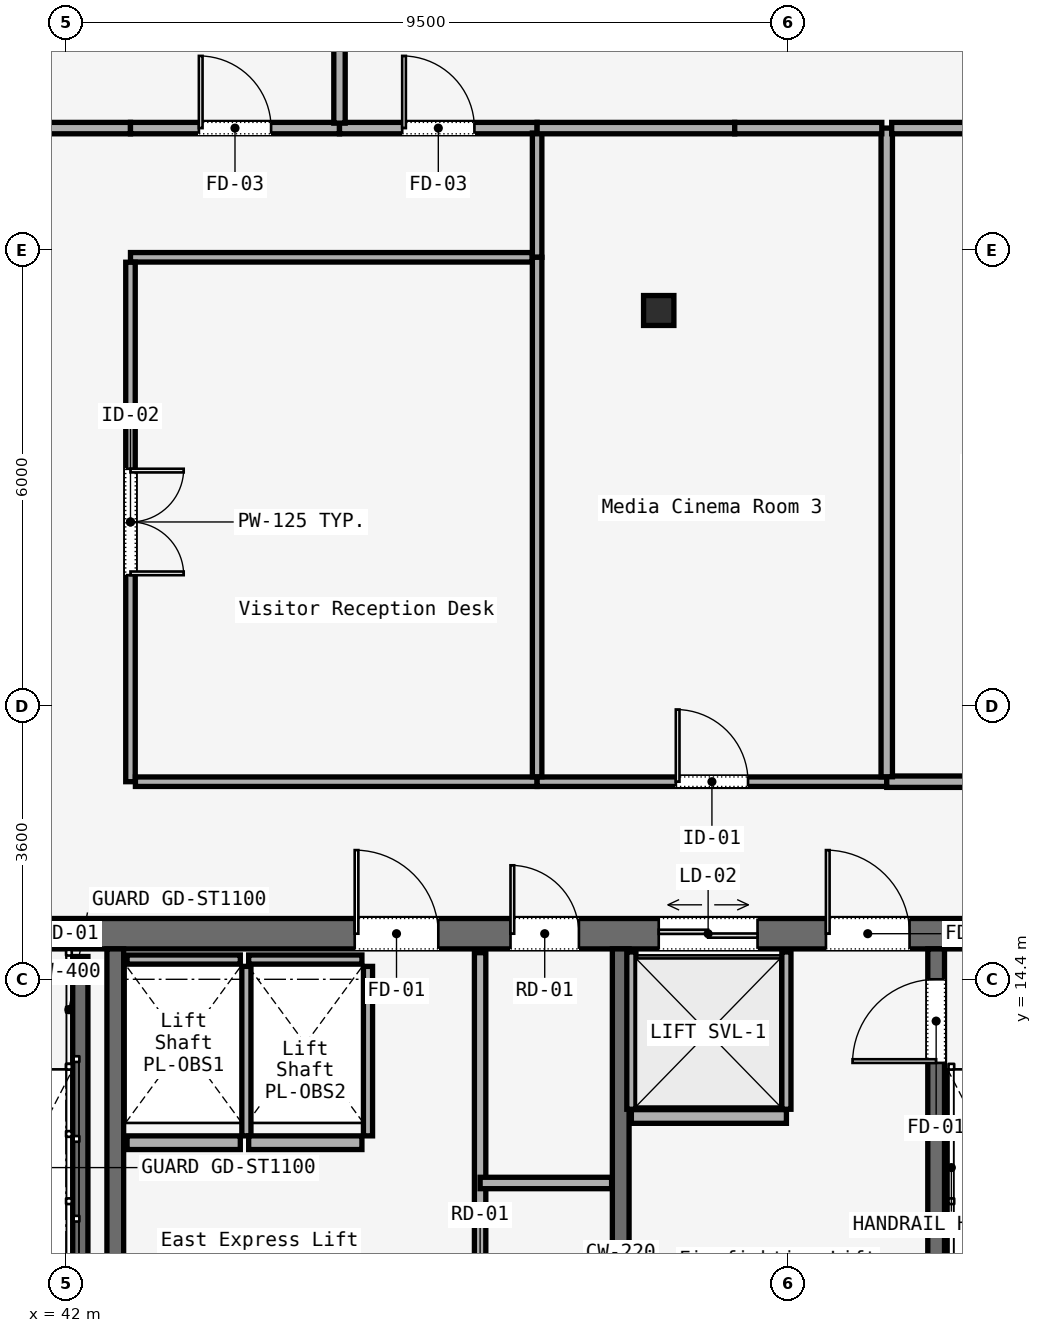
"""IFC4 building model, lengths in metres.
Left out: names, types, materials, properties, quantities, classifications, styles, units other than length and angle.
Written with IfcOpenShell. Run it as: python <this file> out.ifc"""

import sys

from ifc_helpers import new_model, si_unit, direction, frame, frame_2d, origin, origin_2d, place, context, subcontext, project, spatial, rectangle, i_section, extrude, element, fill, save


model = new_model("IFC4")
c1 = context("Model", 3, precision=1e-05, world=origin(), true_north=direction((0.0, 1.0)))
c2 = subcontext(c1, "Body", "Model", "MODEL_VIEW")
j1 = project(units=[si_unit("LENGTHUNIT", "METRE"), si_unit("PLANEANGLEUNIT", "RADIAN")], contexts=[c1])
p1 = place(None, origin())
s1 = spatial("IfcSite", under=j1, at=p1, CompositionType="ELEMENT")
p2 = place(p1, origin())
s2 = spatial("IfcBuilding", under=s1, at=p2, CompositionType="ELEMENT")
p3 = place(p2, frame((0.0, 0.0, 244.6)))
s3 = spatial("IfcBuildingStorey", under=s2, at=p3, CompositionType="ELEMENT", Elevation=244.6)
p4 = place(p3, frame((26.45, 15.0, 0.0), z_axis=(0.0, 0.0, 1.0), x_axis=(1.0, 0.0, 0.0)))
e1 = element("IfcWall", 1, at=p4, inside=s3, PredefinedType="SOLIDWALL", context=c2, shape_type="SweptSolid", body=[
    extrude(rectangle(XDim=31.1, YDim=0.4, at=frame_2d((15.55, 0.0))), origin(), (0.0, 0.0, 1.0), 3.58),
])
p5 = place(p4, frame((1.65, 0.0, 0.0)))
e2 = element("IfcOpeningElement", 2, at=p5, cuts=e1, PredefinedType="OPENING", context=c2, shape_type="SweptSolid", body=[
    extrude(rectangle(XDim=1.1, YDim=2.2, at=frame_2d((0.55, 1.1))), frame((0.0, 0.2, 0.0), z_axis=(0.0, -1.0, 0.0), x_axis=(1.0, 0.0, 0.0)), (0.0, 0.0, 1.0), 0.4),
])
p6 = place(p4, frame((13.65, 0.0, 0.0)))
e3 = element("IfcOpeningElement", 3, at=p6, cuts=e1, PredefinedType="OPENING", context=c2, shape_type="SweptSolid", body=[
    extrude(rectangle(XDim=1.1, YDim=2.2, at=frame_2d((0.55, 1.1))), frame((0.0, 0.2, 0.0), z_axis=(0.0, -1.0, 0.0), x_axis=(1.0, 0.0, 0.0)), (0.0, 0.0, 1.0), 0.4),
])
p7 = place(p4, frame((25.55, 0.0, 0.0)))
e4 = element("IfcOpeningElement", 4, at=p7, cuts=e1, PredefinedType="OPENING", context=c2, shape_type="SweptSolid", body=[
    extrude(rectangle(XDim=1.1, YDim=2.2, at=frame_2d((0.55, 1.1))), frame((0.0, 0.2, 0.0), z_axis=(0.0, -1.0, 0.0), x_axis=(1.0, 0.0, 0.0)), (0.0, 0.0, 1.0), 0.4),
])
p8 = place(p4, frame((19.35, 0.0, 0.0)))
e5 = element("IfcOpeningElement", 5, at=p8, cuts=e1, PredefinedType="OPENING", context=c2, shape_type="SweptSolid", body=[
    extrude(rectangle(XDim=1.1, YDim=2.2, at=frame_2d((0.55, 1.1))), frame((0.0, 0.2, 0.0), z_axis=(0.0, -1.0, 0.0), x_axis=(1.0, 0.0, 0.0)), (0.0, 0.0, 1.0), 0.4),
])
p9 = place(p4, frame((21.4, 0.0, 0.0)))
e6 = element("IfcOpeningElement", 6, at=p9, cuts=e1, PredefinedType="OPENING", context=c2, shape_type="SweptSolid", body=[
    extrude(rectangle(XDim=0.9, YDim=2.1, at=frame_2d((0.45, 1.05))), frame((0.0, 0.2, 0.0), z_axis=(0.0, -1.0, 0.0), x_axis=(1.0, 0.0, 0.0)), (0.0, 0.0, 1.0), 0.4),
])
p10 = place(p4, frame((5.54, 0.0, 0.0)))
e7 = element("IfcOpeningElement", 7, at=p10, cuts=e1, PredefinedType="OPENING", context=c2, shape_type="SweptSolid", body=[
    extrude(rectangle(XDim=0.95, YDim=2.2, at=frame_2d((0.475, 1.1))), frame((0.0, 0.2, 0.0), z_axis=(0.0, -1.0, 0.0), x_axis=(1.0, 0.0, 0.0)), (0.0, 0.0, 1.0), 0.4),
])
p11 = place(p4, frame((9.49, 0.0, 0.0)))
e8 = element("IfcOpeningElement", 8, at=p11, cuts=e1, PredefinedType="OPENING", context=c2, shape_type="SweptSolid", body=[
    extrude(rectangle(XDim=0.95, YDim=2.2, at=frame_2d((0.475, 1.1))), frame((0.0, 0.2, 0.0), z_axis=(0.0, -1.0, 0.0), x_axis=(1.0, 0.0, 0.0)), (0.0, 0.0, 1.0), 0.4),
])
p12 = place(p4, frame((23.35, 0.0, 0.0)))
e9 = element("IfcOpeningElement", 9, at=p12, cuts=e1, PredefinedType="OPENING", context=c2, shape_type="SweptSolid", body=[
    extrude(rectangle(XDim=1.3, YDim=2.3, at=frame_2d((0.65, 1.15))), frame((0.0, 0.2, 0.0), z_axis=(0.0, -1.0, 0.0), x_axis=(1.0, 0.0, 0.0)), (0.0, 0.0, 1.0), 0.4),
])
for number, where, z_axis, x_axis in (
    (10, (42.65, 5.8, 0.0), (0.0, 0.0, 1.0), (0.0, 1.0, 0.0)),
    (11, (49.3, 5.8, 0.0), (0.0, 0.0, 1.0), (0.0, 1.0, 0.0)),
):
    element("IfcWall", number, at=place(p3, frame(where, z_axis=z_axis, x_axis=x_axis)), inside=s3, PredefinedType="SOLIDWALL", context=c2, shape_type="SweptSolid", body=[
        extrude(rectangle(XDim=9.0, YDim=0.22, at=frame_2d((4.5, 0.0))), origin(), (0.0, 0.0, 1.0), 3.58),
    ])
p13 = place(p3, frame((53.45, 5.8, 0.0), z_axis=(0.0, 0.0, 1.0), x_axis=(0.0, 1.0, 0.0)))
e12 = element("IfcWall", 12, at=p13, inside=s3, PredefinedType="SOLIDWALL", context=c2, shape_type="SweptSolid", body=[
    extrude(rectangle(XDim=9.0, YDim=0.22, at=frame_2d((4.5, 0.0))), origin(), (0.0, 0.0, 1.0), 3.58),
])
p14 = place(p13, frame((7.5, 0.0, 0.0)))
e13 = element("IfcOpeningElement", 13, at=p14, cuts=e12, PredefinedType="OPENING", context=c2, shape_type="SweptSolid", body=[
    extrude(rectangle(XDim=1.1, YDim=2.2, at=frame_2d((0.55, 1.1))), frame((0.0, 0.11, 0.0), z_axis=(0.0, -1.0, 0.0), x_axis=(1.0, 0.0, 0.0)), (0.0, 0.0, 1.0), 0.22),
])
p15 = place(p3, frame((49.8, 23.2, 0.0), z_axis=(0.0, 0.0, 1.0), x_axis=(1.0, 0.0, 0.0)))
e14 = element("IfcColumn", 14, at=p15, inside=s3, PredefinedType="COLUMN", context=c2, shape_type="SweptSolid", body=[
    extrude(i_section(OverallWidth=0.399, OverallDepth=0.394, WebThickness=0.023, FlangeThickness=0.037, FilletRadius=0.015, at=origin_2d()), origin(), (0.0, 0.0, 1.0), 3.58),
])
p16 = place(p3, frame((42.19, 14.7, 0.0), z_axis=(0.0, 0.0, 1.0), x_axis=(0.0, -1.0, 0.0)))
e15 = element("IfcWall", 15, at=p16, inside=s3, PredefinedType="SOLIDWALL", context=c2, shape_type="SweptSolid", body=[
    extrude(rectangle(XDim=7.65, YDim=0.2, at=frame_2d((3.825, 0.0))), origin(), (0.0, 0.0, 1.0), 3.8),
])
p17 = place(p3, frame((47.45, 5.9, 0.0), z_axis=(0.0, 0.0, 1.0), x_axis=(0.0, 1.0, 0.0)))
e16 = element("IfcWall", 16, at=p17, inside=s3, PredefinedType="PARTITIONING", context=c2, shape_type="SweptSolid", body=[
    extrude(rectangle(XDim=8.85, YDim=0.15, at=frame_2d((4.425, 0.0))), origin(), (0.0, 0.0, 1.0), 3.01),
])
p18 = place(p17, frame((3.9, 0.0, 0.0)))
e17 = element("IfcOpeningElement", 17, at=p18, cuts=e16, PredefinedType="OPENING", context=c2, shape_type="SweptSolid", body=[
    extrude(rectangle(XDim=0.9, YDim=2.1, at=frame_2d((0.45, 1.05))), frame((0.0, 0.075, 0.0), z_axis=(0.0, -1.0, 0.0), x_axis=(1.0, 0.0, 0.0)), (0.0, 0.0, 1.0), 0.15),
])
p19 = place(p3, frame((47.45, 11.72, 0.0), z_axis=(0.0, 0.0, 1.0), x_axis=(1.0, 0.0, 0.0)))
e18 = element("IfcWall", 18, at=p19, inside=s3, PredefinedType="PARTITIONING", context=c2, shape_type="SweptSolid", body=[
    extrude(rectangle(XDim=1.73, YDim=0.15, at=frame_2d((0.865, 0.0))), origin(), (0.0, 0.0, 1.0), 3.01),
])
p20 = place(p3, frame((42.805, 12.25, 0.0), z_axis=(0.0, 0.0, 1.0), x_axis=(1.0, 0.0, 0.0)))
e19 = element("IfcWall", 19, at=p20, inside=s3, PredefinedType="SOLIDWALL", context=c2, shape_type="SweptSolid", body=[
    extrude(rectangle(XDim=1.49, YDim=0.18, at=frame_2d((0.745, 0.0))), origin(), (0.0, 0.0, 1.0), 3.01),
])
p21 = place(p3, frame((42.805, 14.66, 0.0), z_axis=(0.0, 0.0, 1.0), x_axis=(1.0, 0.0, 0.0)))
e20 = element("IfcWall", 20, at=p21, inside=s3, PredefinedType="SOLIDWALL", context=c2, shape_type="SweptSolid", body=[
    extrude(rectangle(XDim=1.49, YDim=0.12, at=frame_2d((0.745, 0.0))), origin(), (0.0, 0.0, 1.0), 3.01),
])
p22 = place(p3, frame((44.375, 12.34, 0.0), z_axis=(0.0, 0.0, 1.0), x_axis=(0.0, 1.0, 0.0)))
e21 = element("IfcWall", 21, at=p22, inside=s3, PredefinedType="SOLIDWALL", context=c2, shape_type="SweptSolid", body=[
    extrude(rectangle(XDim=2.23, YDim=0.12, at=frame_2d((1.115, 0.0))), origin(), (0.0, 0.0, 1.0), 3.01),
])
p23 = place(p3, frame((44.405, 12.25, 0.0), z_axis=(0.0, 0.0, 1.0), x_axis=(1.0, 0.0, 0.0)))
e22 = element("IfcWall", 22, at=p23, inside=s3, PredefinedType="SOLIDWALL", context=c2, shape_type="SweptSolid", body=[
    extrude(rectangle(XDim=1.49, YDim=0.18, at=frame_2d((0.745, 0.0))), origin(), (0.0, 0.0, 1.0), 3.01),
])
p24 = place(p3, frame((44.405, 14.66, 0.0), z_axis=(0.0, 0.0, 1.0), x_axis=(1.0, 0.0, 0.0)))
e23 = element("IfcWall", 23, at=p24, inside=s3, PredefinedType="SOLIDWALL", context=c2, shape_type="SweptSolid", body=[
    extrude(rectangle(XDim=1.49, YDim=0.12, at=frame_2d((0.745, 0.0))), origin(), (0.0, 0.0, 1.0), 3.01),
])
p25 = place(p3, frame((45.975, 12.34, 0.0), z_axis=(0.0, 0.0, 1.0), x_axis=(0.0, 1.0, 0.0)))
e24 = element("IfcWall", 24, at=p25, inside=s3, PredefinedType="SOLIDWALL", context=c2, shape_type="SweptSolid", body=[
    extrude(rectangle(XDim=2.23, YDim=0.12, at=frame_2d((1.115, 0.0))), origin(), (0.0, 0.0, 1.0), 3.01),
])
p26 = place(p3, frame((49.44, 12.595, 0.0), z_axis=(0.0, 0.0, 1.0), x_axis=(1.0, 0.0, 0.0)))
e25 = element("IfcWall", 25, at=p26, inside=s3, PredefinedType="SOLIDWALL", context=c2, shape_type="SweptSolid", body=[
    extrude(rectangle(XDim=2.04, YDim=0.18, at=frame_2d((1.02, 0.0))), origin(), (0.0, 0.0, 1.0), 3.01),
])
for number, where, z_axis, x_axis in (
    (26, (49.44, 12.69, 0.0), (0.0, 0.0, 1.0), (0.0, 1.0, 0.0)),
    (27, (51.48, 12.69, 0.0), (0.0, 0.0, 1.0), (0.0, 1.0, 0.0)),
):
    element("IfcWall", number, at=place(p3, frame(where, z_axis=z_axis, x_axis=x_axis)), inside=s3, PredefinedType="SOLIDWALL", context=c2, shape_type="SweptSolid", body=[
        extrude(rectangle(XDim=2.07, YDim=0.12, at=frame_2d((1.035, 0.0))), origin(), (0.0, 0.0, 1.0), 3.01),
    ])
p27 = place(p3, frame((41.15, 25.6, 0.0), z_axis=(0.0, 0.0, 1.0), x_axis=(1.0, 0.0, 0.0)))
e28 = element("IfcWall", 28, at=p27, inside=s3, PredefinedType="PARTITIONING", context=c2, shape_type="SweptSolid", body=[
    extrude(rectangle(XDim=1.7, YDim=0.15, at=frame_2d((0.85, 0.0))), origin(), (0.0, 0.0, 1.0), 3.01),
])
p28 = place(p3, frame((42.85, 25.6, 0.0), z_axis=(0.0, 0.0, 1.0), x_axis=(1.0, 0.0, 0.0)))
e29 = element("IfcWall", 29, at=p28, inside=s3, PredefinedType="PARTITIONING", context=c2, shape_type="SweptSolid", body=[
    extrude(rectangle(XDim=2.75, YDim=0.15, at=frame_2d((1.375, 0.0))), origin(), (0.0, 0.0, 1.0), 3.01),
])
p29 = place(p28, frame((0.9, 0.0, 0.0)))
e30 = element("IfcOpeningElement", 30, at=p29, cuts=e29, PredefinedType="OPENING", context=c2, shape_type="SweptSolid", body=[
    extrude(rectangle(XDim=0.95, YDim=2.2, at=frame_2d((0.475, 1.1))), frame((0.0, 0.075, 0.0), z_axis=(0.0, -1.0, 0.0), x_axis=(1.0, 0.0, 0.0)), (0.0, 0.0, 1.0), 0.15),
])
p30 = place(p3, frame((45.6, 25.6, 0.0), z_axis=(0.0, 0.0, 1.0), x_axis=(1.0, 0.0, 0.0)))
e31 = element("IfcWall", 31, at=p30, inside=s3, PredefinedType="PARTITIONING", context=c2, shape_type="SweptSolid", body=[
    extrude(rectangle(XDim=2.6, YDim=0.15, at=frame_2d((1.3, 0.0))), origin(), (0.0, 0.0, 1.0), 3.01),
])
p31 = place(p30, frame((0.825, 0.0, 0.0)))
e32 = element("IfcOpeningElement", 32, at=p31, cuts=e31, PredefinedType="OPENING", context=c2, shape_type="SweptSolid", body=[
    extrude(rectangle(XDim=0.95, YDim=2.2, at=frame_2d((0.475, 1.1))), frame((0.0, 0.075, 0.0), z_axis=(0.0, -1.0, 0.0), x_axis=(1.0, 0.0, 0.0)), (0.0, 0.0, 1.0), 0.15),
])
p32 = place(p3, frame((48.2, 25.535, 0.0), z_axis=(0.0, 0.0, 1.0), x_axis=(0.0, -1.0, 0.0)))
e33 = element("IfcWall", 33, at=p32, inside=s3, PredefinedType="PARTITIONING", context=c2, shape_type="SweptSolid", body=[
    extrude(rectangle(XDim=1.635, YDim=0.125, at=frame_2d((0.817, 0.0))), origin(), (0.0, 0.0, 1.0), 3.01),
])
p33 = place(p3, frame((48.135, 23.9, 0.0), z_axis=(0.0, 0.0, 1.0), x_axis=(-1.0, 0.0, 0.0)))
e34 = element("IfcWall", 34, at=p33, inside=s3, PredefinedType="PARTITIONING", context=c2, shape_type="SweptSolid", body=[
    extrude(rectangle(XDim=5.285, YDim=0.125, at=frame_2d((2.643, 0.0))), origin(), (0.0, 0.0, 1.0), 3.01),
])
p34 = place(p3, frame((42.85, 23.835, 0.0), z_axis=(0.0, 0.0, 1.0), x_axis=(0.0, -1.0, 0.0)))
e35 = element("IfcWall", 35, at=p34, inside=s3, PredefinedType="PARTITIONING", context=c2, shape_type="SweptSolid", body=[
    extrude(rectangle(XDim=6.835, YDim=0.125, at=frame_2d((3.417, 0.0))), origin(), (0.0, 0.0, 1.0), 3.01),
])
p35 = place(p34, frame((2.718, 0.0, 0.0)))
e36 = element("IfcOpeningElement", 36, at=p35, cuts=e35, PredefinedType="OPENING", context=c2, shape_type="SweptSolid", body=[
    extrude(rectangle(XDim=1.4, YDim=2.2, at=frame_2d((0.7, 1.1))), frame((0.0, 0.062, 0.0), z_axis=(0.0, -1.0, 0.0), x_axis=(1.0, 0.0, 0.0)), (0.0, 0.0, 1.0), 0.125),
])
p36 = place(p3, frame((42.915, 17.0, 0.0), z_axis=(0.0, 0.0, 1.0), x_axis=(1.0, 0.0, 0.0)))
e37 = element("IfcWall", 37, at=p36, inside=s3, PredefinedType="PARTITIONING", context=c2, shape_type="SweptSolid", body=[
    extrude(rectangle(XDim=5.285, YDim=0.125, at=frame_2d((2.643, 0.0))), origin(), (0.0, 0.0, 1.0), 3.01),
])
p37 = place(p3, frame((48.2, 17.0, 0.0), z_axis=(0.0, 0.0, 1.0), x_axis=(1.0, 0.0, 0.0)))
e38 = element("IfcWall", 38, at=p37, inside=s3, PredefinedType="PARTITIONING", context=c2, shape_type="SweptSolid", body=[
    extrude(rectangle(XDim=4.6, YDim=0.125, at=frame_2d((2.3, 0.0))), origin(), (0.0, 0.0, 1.0), 3.01),
])
p38 = place(p37, frame((1.825, 0.0, 0.0)))
e39 = element("IfcOpeningElement", 39, at=p38, cuts=e38, PredefinedType="OPENING", context=c2, shape_type="SweptSolid", body=[
    extrude(rectangle(XDim=0.95, YDim=2.2, at=frame_2d((0.475, 1.1))), frame((0.0, 0.062, 0.0), z_axis=(0.0, -1.0, 0.0), x_axis=(1.0, 0.0, 0.0)), (0.0, 0.0, 1.0), 0.125),
])
p39 = place(p3, frame((52.8, 17.0, 0.0), z_axis=(0.0, 0.0, 1.0), x_axis=(1.0, 0.0, 0.0)))
e40 = element("IfcWall", 40, at=p39, inside=s3, PredefinedType="PARTITIONING", context=c2, shape_type="SweptSolid", body=[
    extrude(rectangle(XDim=4.6, YDim=0.15, at=frame_2d((2.3, 0.0))), origin(), (0.0, 0.0, 1.0), 3.01),
])
p40 = place(p39, frame((1.825, 0.0, 0.0)))
e41 = element("IfcOpeningElement", 41, at=p40, cuts=e40, PredefinedType="OPENING", context=c2, shape_type="SweptSolid", body=[
    extrude(rectangle(XDim=0.95, YDim=2.2, at=frame_2d((0.475, 1.1))), frame((0.0, 0.075, 0.0), z_axis=(0.0, -1.0, 0.0), x_axis=(1.0, 0.0, 0.0)), (0.0, 0.0, 1.0), 0.15),
])
p41 = place(p3, frame((48.2, 23.9, 0.0), z_axis=(0.0, 0.0, 1.0), x_axis=(0.0, -1.0, 0.0)))
e42 = element("IfcWall", 42, at=p41, inside=s3, PredefinedType="PARTITIONING", context=c2, shape_type="SweptSolid", body=[
    extrude(rectangle(XDim=6.835, YDim=0.125, at=frame_2d((3.417, 0.0))), origin(), (0.0, 0.0, 1.0), 3.01),
])
p42 = place(p3, frame((52.8, 17.065, 0.0), z_axis=(0.0, 0.0, 1.0), x_axis=(0.0, 1.0, 0.0)))
e43 = element("IfcWall", 43, at=p42, inside=s3, PredefinedType="PARTITIONING", context=c2, shape_type="SweptSolid", body=[
    extrude(rectangle(XDim=8.535, YDim=0.15, at=frame_2d((4.268, 0.0))), origin(), (0.0, 0.0, 1.0), 3.01),
])
p43 = place(p3, frame((52.865, 25.6, 0.0), z_axis=(0.0, 0.0, 1.0), x_axis=(1.0, 0.0, 0.0)))
e44 = element("IfcWall", 44, at=p43, inside=s3, PredefinedType="PARTITIONING", context=c2, shape_type="SweptSolid", body=[
    extrude(rectangle(XDim=3.633, YDim=0.15, at=frame_2d((1.817, 0.0))), origin(), (0.0, 0.0, 1.0), 3.01),
])
p44 = place(p3, frame((48.2, 25.6, 0.0), z_axis=(0.0, 0.0, 1.0), x_axis=(1.0, 0.0, 0.0)))
e45 = element("IfcWall", 45, at=p44, inside=s3, PredefinedType="PARTITIONING", context=c2, shape_type="SweptSolid", body=[
    extrude(rectangle(XDim=2.6, YDim=0.15, at=frame_2d((1.3, 0.0))), origin(), (0.0, 0.0, 1.0), 3.01),
])
p45 = place(p3, frame((50.8, 25.6, 0.0), z_axis=(0.0, 0.0, 1.0), x_axis=(1.0, 0.0, 0.0)))
e46 = element("IfcWall", 46, at=p45, inside=s3, PredefinedType="PARTITIONING", context=c2, shape_type="SweptSolid", body=[
    extrude(rectangle(XDim=1.935, YDim=0.15, at=frame_2d((0.968, 0.0))), origin(), (0.0, 0.0, 1.0), 3.01),
])
p46 = place(p3, frame((45.6, 25.665, 0.0), z_axis=(0.0, 0.0, 1.0), x_axis=(0.0, 1.0, 0.0)))
e47 = element("IfcWall", 47, at=p46, inside=s3, PredefinedType="PARTITIONING", context=c2, shape_type="SweptSolid", body=[
    extrude(rectangle(XDim=18.811, YDim=0.15, at=frame_2d((9.406, 0.0))), origin(), (0.0, 0.0, 1.0), 3.01),
])
p47 = place(p7, origin())
e48 = element("IfcDoor", 48, at=p47, inside=s3, OperationType="SINGLE_SWING_RIGHT", PredefinedType="DOOR", context=c2, shape_type="SweptSolid", body=[
    extrude(rectangle(XDim=1.1, YDim=2.2, at=frame_2d((0.55, 1.1))), frame((0.0, 0.025, 0.0), z_axis=(0.0, -1.0, 0.0), x_axis=(1.0, 0.0, 0.0)), (0.0, 0.0, 1.0), 0.05),
])
fill(e4, e48)
p48 = place(p8, origin())
e49 = element("IfcDoor", 49, at=p48, inside=s3, OperationType="SINGLE_SWING_LEFT", PredefinedType="DOOR", context=c2, shape_type="SweptSolid", body=[
    extrude(rectangle(XDim=1.1, YDim=2.2, at=frame_2d((0.55, 1.1))), frame((0.0, 0.025, 0.0), z_axis=(0.0, -1.0, 0.0), x_axis=(1.0, 0.0, 0.0)), (0.0, 0.0, 1.0), 0.05),
])
fill(e5, e49)
p49 = place(p9, origin())
e50 = element("IfcDoor", 50, at=p49, inside=s3, OperationType="SINGLE_SWING_LEFT", PredefinedType="DOOR", context=c2, shape_type="SweptSolid", body=[
    extrude(rectangle(XDim=0.9, YDim=2.1, at=frame_2d((0.45, 1.05))), frame((0.0, 0.025, 0.0), z_axis=(0.0, -1.0, 0.0), x_axis=(1.0, 0.0, 0.0)), (0.0, 0.0, 1.0), 0.05),
])
fill(e6, e50)
p50 = place(p14, origin())
e51 = element("IfcDoor", 51, at=p50, inside=s3, OperationType="SINGLE_SWING_LEFT", PredefinedType="DOOR", context=c2, shape_type="SweptSolid", body=[
    extrude(rectangle(XDim=1.1, YDim=2.2, at=frame_2d((0.55, 1.1))), frame((0.0, 0.025, 0.0), z_axis=(0.0, -1.0, 0.0), x_axis=(1.0, 0.0, 0.0)), (0.0, 0.0, 1.0), 0.05),
])
fill(e13, e51)
p51 = place(p12, origin())
e52 = element("IfcDoor", 52, at=p51, inside=s3, OperationType="DOUBLE_DOOR_SLIDING", PredefinedType="DOOR", context=c2, shape_type="SweptSolid", body=[
    extrude(rectangle(XDim=1.3, YDim=2.3, at=frame_2d((0.65, 1.15))), frame((0.0, 0.025, 0.0), z_axis=(0.0, -1.0, 0.0), x_axis=(1.0, 0.0, 0.0)), (0.0, 0.0, 1.0), 0.05),
])
fill(e9, e52)
p52 = place(p35, origin())
e53 = element("IfcDoor", 53, at=p52, inside=s3, OperationType="SINGLE_SWING_LEFT", PredefinedType="DOOR", context=c2, shape_type="SweptSolid", body=[
    extrude(rectangle(XDim=1.4, YDim=2.2, at=frame_2d((0.7, 1.1))), frame((0.0, 0.025, 0.0), z_axis=(0.0, -1.0, 0.0), x_axis=(1.0, 0.0, 0.0)), (0.0, 0.0, 1.0), 0.05),
])
fill(e36, e53)
p53 = place(p38, origin())
e54 = element("IfcDoor", 54, at=p53, inside=s3, OperationType="SINGLE_SWING_LEFT", PredefinedType="DOOR", context=c2, shape_type="SweptSolid", body=[
    extrude(rectangle(XDim=0.95, YDim=2.2, at=frame_2d((0.475, 1.1))), frame((0.0, 0.025, 0.0), z_axis=(0.0, -1.0, 0.0), x_axis=(1.0, 0.0, 0.0)), (0.0, 0.0, 1.0), 0.05),
])
fill(e39, e54)
p54 = place(p31, origin())
e55 = element("IfcDoor", 55, at=p54, inside=s3, OperationType="SINGLE_SWING_RIGHT", PredefinedType="DOOR", context=c2, shape_type="SweptSolid", body=[
    extrude(rectangle(XDim=0.95, YDim=2.2, at=frame_2d((0.475, 1.1))), frame((0.0, 0.025, 0.0), z_axis=(0.0, -1.0, 0.0), x_axis=(1.0, 0.0, 0.0)), (0.0, 0.0, 1.0), 0.05),
])
fill(e32, e55)
p55 = place(p29, origin())
e56 = element("IfcDoor", 56, at=p55, inside=s3, OperationType="SINGLE_SWING_RIGHT", PredefinedType="DOOR", context=c2, shape_type="SweptSolid", body=[
    extrude(rectangle(XDim=0.95, YDim=2.2, at=frame_2d((0.475, 1.1))), frame((0.0, 0.025, 0.0), z_axis=(0.0, -1.0, 0.0), x_axis=(1.0, 0.0, 0.0)), (0.0, 0.0, 1.0), 0.05),
])
fill(e30, e56)
save(model, sys.argv[1])
